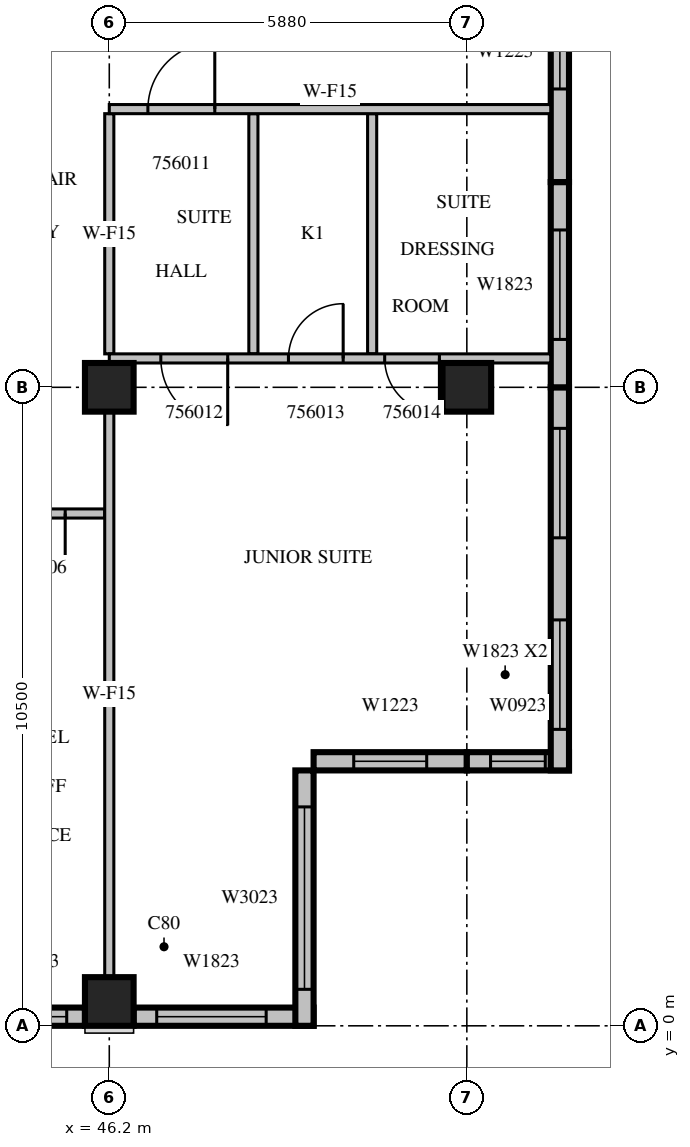
"""IFC4 building model, lengths in metres.
Left out: names, types, materials, properties, quantities, classifications, styles, units other than length and angle.
Written with IfcOpenShell. Run it as: python <this file> out.ifc"""

import sys

from ifc_helpers import new_model, si_unit, direction, frame, frame_2d, origin, origin_2d, place, context, subcontext, project, spatial, rectangle, extrude, source, transform, mapped, element, fill, save


model = new_model("IFC4")
c1 = context("Model", 3, precision=1e-05, world=origin(), true_north=direction((0.0, 1.0)))
c2 = subcontext(c1, "Body", "Model", "MODEL_VIEW")
j1 = project(units=[si_unit("LENGTHUNIT", "METRE"), si_unit("PLANEANGLEUNIT", "RADIAN")], contexts=[c1])
p1 = place(None, origin())
s1 = spatial("IfcSite", under=j1, at=p1, CompositionType="ELEMENT")
p2 = place(p1, origin())
s2 = spatial("IfcBuilding", under=s1, at=p2, CompositionType="ELEMENT")
p3 = place(p2, frame((0.0, 0.0, 246.2)))
s3 = spatial("IfcBuildingStorey", under=s2, at=p3, CompositionType="ELEMENT", Elevation=246.2)
m1 = source(origin(), c2, "Body", "SweptSolid", [
    extrude(rectangle(XDim=0.8, YDim=0.8, at=origin_2d()), origin(), (0.0, 0.0, 1.0), 3.8),
])
for number, where, z_axis, x_axis in (
    (1, (46.2, 0.4, 0.0), (0.0, 0.0, 1.0), (1.0, 0.0, 0.0)),
    (2, (46.2, 10.5, 0.0), (0.0, 0.0, 1.0), (1.0, 0.0, 0.0)),
    (3, (52.08, 10.5, 0.0), (0.0, 0.0, 1.0), (1.0, 0.0, 0.0)),
):
    element("IfcColumn", number, at=place(p3, frame(where, z_axis=z_axis, x_axis=x_axis)), inside=s3, PredefinedType="COLUMN", context=c2, shape_type="MappedRepresentation", body=[
        mapped(m1, transform((0.0, 0.0, 0.0), scale=1.0)),
    ])
m2 = source(origin(), c2, "Body", "SweptSolid", [
    extrude(rectangle(XDim=1.8, YDim=0.3, at=frame_2d((0.9, 0.0))), origin(), (0.0, 0.0, 1.0), 3.4),
])
p4 = place(p3, frame((44.0, 0.15, 0.0), z_axis=(0.0, 0.0, 1.0), x_axis=(1.0, 0.0, 0.0)))
e4 = element("IfcWall", 4, at=p4, inside=s3, PredefinedType="STANDARD", context=c2, shape_type="MappedRepresentation", body=[
    mapped(m2, transform((0.0, 0.0, 0.0), scale=1.0)),
])
m3 = source(origin(), c2, "Body", "SweptSolid", [
    extrude(rectangle(XDim=1.2, YDim=2.3, at=frame_2d((0.6, 1.15))), frame((0.0, 0.16, 0.0), z_axis=(0.0, -1.0, 0.0), x_axis=(1.0, 0.0, 0.0)), (0.0, 0.0, 1.0), 0.32),
])
p5 = place(p4, frame((0.3, 0.0, 0.6)))
e5 = element("IfcOpeningElement", 5, at=p5, cuts=e4, PredefinedType="OPENING", context=c2, shape_type="MappedRepresentation", body=[
    mapped(m3, transform((0.0, 0.0, 0.0), scale=1.0)),
])
m4 = source(origin(), c2, "Body", "SweptSolid", [
    extrude(rectangle(XDim=2.96, YDim=0.3, at=frame_2d((1.48, 0.0))), origin(), (0.0, 0.0, 1.0), 3.4),
])
p6 = place(p3, frame((46.6, 0.15, 0.0), z_axis=(0.0, 0.0, 1.0), x_axis=(1.0, 0.0, 0.0)))
e6 = element("IfcWall", 6, at=p6, inside=s3, PredefinedType="STANDARD", context=c2, shape_type="MappedRepresentation", body=[
    mapped(m4, transform((0.0, 0.0, 0.0), scale=1.0)),
])
m5 = source(origin(), c2, "Body", "SweptSolid", [
    extrude(rectangle(XDim=1.8, YDim=2.3, at=frame_2d((0.9, 1.15))), frame((0.0, 0.16, 0.0), z_axis=(0.0, -1.0, 0.0), x_axis=(1.0, 0.0, 0.0)), (0.0, 0.0, 1.0), 0.32),
])
p7 = place(p6, frame((0.38, 0.0, 0.6)))
e7 = element("IfcOpeningElement", 7, at=p7, cuts=e6, PredefinedType="OPENING", context=c2, shape_type="MappedRepresentation", body=[
    mapped(m5, transform((0.0, 0.0, 0.0), scale=1.0)),
])
m6 = source(origin(), c2, "Body", "SweptSolid", [
    extrude(rectangle(XDim=4.2, YDim=0.3, at=frame_2d((2.1, 0.0))), origin(), (0.0, 0.0, 1.0), 3.4),
])
p8 = place(p3, frame((49.41, 0.0, 0.0), z_axis=(0.0, 0.0, 1.0), x_axis=(0.0, 1.0, 0.0)))
e8 = element("IfcWall", 8, at=p8, inside=s3, PredefinedType="STANDARD", context=c2, shape_type="MappedRepresentation", body=[
    mapped(m6, transform((0.0, 0.0, 0.0), scale=1.0)),
])
m7 = source(origin(), c2, "Body", "SweptSolid", [
    extrude(rectangle(XDim=3.0, YDim=2.3, at=frame_2d((1.5, 1.15))), frame((0.0, 0.16, 0.0), z_axis=(0.0, -1.0, 0.0), x_axis=(1.0, 0.0, 0.0)), (0.0, 0.0, 1.0), 0.32),
])
p9 = place(p8, frame((0.6, 0.0, 0.6)))
e9 = element("IfcOpeningElement", 9, at=p9, cuts=e8, PredefinedType="OPENING", context=c2, shape_type="MappedRepresentation", body=[
    mapped(m7, transform((0.0, 0.0, 0.0), scale=1.0)),
])
m8 = source(origin(), c2, "Body", "SweptSolid", [
    extrude(rectangle(XDim=2.52, YDim=0.3, at=frame_2d((1.26, 0.0))), origin(), (0.0, 0.0, 1.0), 3.4),
])
p10 = place(p3, frame((49.56, 4.35, 0.0), z_axis=(0.0, 0.0, 1.0), x_axis=(1.0, 0.0, 0.0)))
e10 = element("IfcWall", 10, at=p10, inside=s3, PredefinedType="STANDARD", context=c2, shape_type="MappedRepresentation", body=[
    mapped(m8, transform((0.0, 0.0, 0.0), scale=1.0)),
])
p11 = place(p10, frame((0.66, 0.0, 0.6)))
e11 = element("IfcOpeningElement", 11, at=p11, cuts=e10, PredefinedType="OPENING", context=c2, shape_type="MappedRepresentation", body=[
    mapped(m3, transform((0.0, 0.0, 0.0), scale=1.0)),
])
m9 = source(origin(), c2, "Body", "SweptSolid", [
    extrude(rectangle(XDim=1.68, YDim=0.3, at=frame_2d((0.84, 0.0))), origin(), (0.0, 0.0, 1.0), 3.4),
])
p12 = place(p3, frame((52.08, 4.35, 0.0), z_axis=(0.0, 0.0, 1.0), x_axis=(1.0, 0.0, 0.0)))
e12 = element("IfcWall", 12, at=p12, inside=s3, PredefinedType="STANDARD", context=c2, shape_type="MappedRepresentation", body=[
    mapped(m9, transform((0.0, 0.0, 0.0), scale=1.0)),
])
m10 = source(origin(), c2, "Body", "SweptSolid", [
    extrude(rectangle(XDim=0.9, YDim=2.3, at=frame_2d((0.45, 1.15))), frame((0.0, 0.16, 0.0), z_axis=(0.0, -1.0, 0.0), x_axis=(1.0, 0.0, 0.0)), (0.0, 0.0, 1.0), 0.32),
])
p13 = place(p12, frame((0.39, 0.0, 0.6)))
e13 = element("IfcOpeningElement", 13, at=p13, cuts=e12, PredefinedType="OPENING", context=c2, shape_type="MappedRepresentation", body=[
    mapped(m10, transform((0.0, 0.0, 0.0), scale=1.0)),
])
m11 = source(origin(), c2, "Body", "SweptSolid", [
    extrude(rectangle(XDim=6.3, YDim=0.3, at=frame_2d((3.15, 0.0))), origin(), (0.0, 0.0, 1.0), 3.4),
])
p14 = place(p3, frame((53.61, 4.2, 0.0), z_axis=(0.0, 0.0, 1.0), x_axis=(0.0, 1.0, 0.0)))
e14 = element("IfcWall", 14, at=p14, inside=s3, PredefinedType="STANDARD", context=c2, shape_type="MappedRepresentation", body=[
    mapped(m11, transform((0.0, 0.0, 0.0), scale=1.0)),
])
p15 = place(p14, frame((0.675, 0.0, 0.6)))
e15 = element("IfcOpeningElement", 15, at=p15, cuts=e14, PredefinedType="OPENING", context=c2, shape_type="MappedRepresentation", body=[
    mapped(m5, transform((0.0, 0.0, 0.0), scale=1.0)),
])
p16 = place(p14, frame((3.825, 0.0, 0.6)))
e16 = element("IfcOpeningElement", 16, at=p16, cuts=e14, PredefinedType="OPENING", context=c2, shape_type="MappedRepresentation", body=[
    mapped(m5, transform((0.0, 0.0, 0.0), scale=1.0)),
])
m12 = source(origin(), c2, "Body", "SweptSolid", [
    extrude(rectangle(XDim=3.375, YDim=0.3, at=frame_2d((1.688, 0.0))), origin(), (0.0, 0.0, 1.0), 3.4),
])
p17 = place(p3, frame((53.61, 10.5, 0.0), z_axis=(0.0, 0.0, 1.0), x_axis=(0.0, 1.0, 0.0)))
e17 = element("IfcWall", 17, at=p17, inside=s3, PredefinedType="STANDARD", context=c2, shape_type="MappedRepresentation", body=[
    mapped(m12, transform((0.0, 0.0, 0.0), scale=1.0)),
])
p18 = place(p17, frame((0.787, 0.0, 0.6)))
e18 = element("IfcOpeningElement", 18, at=p18, cuts=e17, PredefinedType="OPENING", context=c2, shape_type="MappedRepresentation", body=[
    mapped(m5, transform((0.0, 0.0, 0.0), scale=1.0)),
])
p19 = place(p3, frame((53.61, 13.875, 0.0), z_axis=(0.0, 0.0, 1.0), x_axis=(0.0, 1.0, 0.0)))
e19 = element("IfcWall", 19, at=p19, inside=s3, PredefinedType="STANDARD", context=c2, shape_type="MappedRepresentation", body=[
    mapped(m12, transform((0.0, 0.0, 0.0), scale=1.0)),
])
p20 = place(p19, frame((1.531, 0.0, 0.6)))
e20 = element("IfcOpeningElement", 20, at=p20, cuts=e19, PredefinedType="OPENING", context=c2, shape_type="MappedRepresentation", body=[
    mapped(m3, transform((0.0, 0.0, 0.0), scale=1.0)),
])
m13 = source(origin(), c2, "Body", "SweptSolid", [
    extrude(rectangle(XDim=2.2, YDim=0.15, at=frame_2d((1.1, 0.0))), origin(), (0.0, 0.0, 1.0), 3.4),
])
p21 = place(p3, frame((46.125, 8.425, 0.0), z_axis=(0.0, 0.0, 1.0), x_axis=(-1.0, 0.0, 0.0)))
e21 = element("IfcWall", 21, at=p21, inside=s3, PredefinedType="PARTITIONING", context=c2, shape_type="MappedRepresentation", body=[
    mapped(m13, transform((0.0, 0.0, 0.0), scale=1.0)),
])
m14 = source(origin(), c2, "Body", "SweptSolid", [
    extrude(rectangle(XDim=0.9, YDim=2.1, at=frame_2d((0.45, 1.05))), frame((0.0, 0.085, 0.0), z_axis=(0.0, -1.0, 0.0), x_axis=(1.0, 0.0, 0.0)), (0.0, 0.0, 1.0), 0.17),
])
p22 = place(p21, frame((0.65, 0.0, 0.0)))
e22 = element("IfcOpeningElement", 22, at=p22, cuts=e21, PredefinedType="OPENING", context=c2, shape_type="MappedRepresentation", body=[
    mapped(m14, transform((0.0, 0.0, 0.0), scale=1.0)),
])
m15 = source(origin(), c2, "Body", "SweptSolid", [
    extrude(rectangle(XDim=3.95, YDim=0.15, at=frame_2d((1.975, 0.0))), origin(), (0.0, 0.0, 1.0), 3.4),
])
for number, where, z_axis, x_axis in (
    (23, (48.57, 11.05, 0.0), (0.0, 0.0, 1.0), (0.0, 1.0, 0.0)),
    (24, (50.523, 11.05, 0.0), (0.0, 0.0, 1.0), (0.0, 1.0, 0.0)),
):
    element("IfcWall", number, at=place(p3, frame(where, z_axis=z_axis, x_axis=x_axis)), inside=s3, PredefinedType="PARTITIONING", context=c2, shape_type="MappedRepresentation", body=[
        mapped(m15, transform((0.0, 0.0, 0.0), scale=1.0)),
    ])
m16 = source(origin(), c2, "Body", "SweptSolid", [
    extrude(rectangle(XDim=9.302, YDim=0.15, at=frame_2d((4.651, 0.0))), origin(), (0.0, 0.0, 1.0), 3.4),
])
p23 = place(p3, frame((46.2, 0.799, 0.0), z_axis=(0.0, 0.0, 1.0), x_axis=(0.0, 1.0, 0.0)))
e25 = element("IfcWall", 25, at=p23, inside=s3, PredefinedType="PARTITIONING", context=c2, shape_type="MappedRepresentation", body=[
    mapped(m16, transform((0.0, 0.0, 0.0), scale=1.0)),
])
p24 = place(p3, frame((46.2, 11.05, 0.0), z_axis=(0.0, 0.0, 1.0), x_axis=(0.0, 1.0, 0.0)))
e26 = element("IfcWall", 26, at=p24, inside=s3, PredefinedType="PARTITIONING", context=c2, shape_type="MappedRepresentation", body=[
    mapped(m15, transform((0.0, 0.0, 0.0), scale=1.0)),
])
m17 = source(origin(), c2, "Body", "SweptSolid", [
    extrude(rectangle(XDim=7.26, YDim=0.15, at=frame_2d((3.63, 0.0))), origin(), (0.0, 0.0, 1.0), 3.4),
])
p25 = place(p3, frame((53.46, 10.975, 0.0), z_axis=(0.0, 0.0, 1.0), x_axis=(-1.0, 0.0, 0.0)))
e27 = element("IfcWall", 27, at=p25, inside=s3, PredefinedType="PARTITIONING", context=c2, shape_type="MappedRepresentation", body=[
    mapped(m17, transform((0.0, 0.0, 0.0), scale=1.0)),
])
m18 = source(origin(), c2, "Body", "SweptSolid", [
    extrude(rectangle(XDim=1.1, YDim=2.1, at=frame_2d((0.55, 1.05))), frame((0.0, 0.085, 0.0), z_axis=(0.0, -1.0, 0.0), x_axis=(1.0, 0.0, 0.0)), (0.0, 0.0, 1.0), 0.17),
])
p26 = place(p25, frame((5.313, 0.0, 0.0)))
e28 = element("IfcOpeningElement", 28, at=p26, cuts=e27, PredefinedType="OPENING", context=c2, shape_type="MappedRepresentation", body=[
    mapped(m18, transform((0.0, 0.0, 0.0), scale=1.0)),
])
p27 = place(p25, frame((3.414, 0.0, 0.0)))
e29 = element("IfcOpeningElement", 29, at=p27, cuts=e27, PredefinedType="OPENING", context=c2, shape_type="MappedRepresentation", body=[
    mapped(m14, transform((0.0, 0.0, 0.0), scale=1.0)),
])
p28 = place(p25, frame((1.831, 0.0, 0.0)))
e30 = element("IfcOpeningElement", 30, at=p28, cuts=e27, PredefinedType="OPENING", context=c2, shape_type="MappedRepresentation", body=[
    mapped(m14, transform((0.0, 0.0, 0.0), scale=1.0)),
])
p29 = place(p3, frame((53.46, 15.075, 0.0), z_axis=(0.0, 0.0, 1.0), x_axis=(-1.0, 0.0, 0.0)))
e31 = element("IfcWall", 31, at=p29, inside=s3, PredefinedType="PARTITIONING", context=c2, shape_type="MappedRepresentation", body=[
    mapped(m17, transform((0.0, 0.0, 0.0), scale=1.0)),
])
p30 = place(p29, frame((5.525, 0.0, 0.0)))
e32 = element("IfcOpeningElement", 32, at=p30, cuts=e31, PredefinedType="OPENING", context=c2, shape_type="MappedRepresentation", body=[
    mapped(m18, transform((0.0, 0.0, 0.0), scale=1.0)),
])
m19 = source(origin(), c2, "Body", "SweptSolid", [
    extrude(rectangle(XDim=1.2, YDim=2.3, at=frame_2d((0.6, 1.15))), frame((0.0, 0.03, 0.0), z_axis=(0.0, -1.0, 0.0), x_axis=(1.0, 0.0, 0.0)), (0.0, 0.0, 1.0), 0.06),
])
p31 = place(p5, origin())
e33 = element("IfcWindow", 33, at=p31, inside=s3, PartitioningType="SINGLE_PANEL", PredefinedType="WINDOW", context=c2, shape_type="MappedRepresentation", body=[
    mapped(m19, transform((0.0, 0.0, 0.0), scale=1.0)),
])
fill(e5, e33)
m20 = source(origin(), c2, "Body", "SweptSolid", [
    extrude(rectangle(XDim=1.8, YDim=2.3, at=frame_2d((0.9, 1.15))), frame((0.0, 0.03, 0.0), z_axis=(0.0, -1.0, 0.0), x_axis=(1.0, 0.0, 0.0)), (0.0, 0.0, 1.0), 0.06),
])
p32 = place(p7, origin())
e34 = element("IfcWindow", 34, at=p32, inside=s3, PartitioningType="SINGLE_PANEL", PredefinedType="WINDOW", context=c2, shape_type="MappedRepresentation", body=[
    mapped(m20, transform((0.0, 0.0, 0.0), scale=1.0)),
])
fill(e7, e34)
m21 = source(origin(), c2, "Body", "SweptSolid", [
    extrude(rectangle(XDim=3.0, YDim=2.3, at=frame_2d((1.5, 1.15))), frame((0.0, 0.03, 0.0), z_axis=(0.0, -1.0, 0.0), x_axis=(1.0, 0.0, 0.0)), (0.0, 0.0, 1.0), 0.06),
])
p33 = place(p9, origin())
e35 = element("IfcWindow", 35, at=p33, inside=s3, PartitioningType="SINGLE_PANEL", PredefinedType="WINDOW", context=c2, shape_type="MappedRepresentation", body=[
    mapped(m21, transform((0.0, 0.0, 0.0), scale=1.0)),
])
fill(e9, e35)
p34 = place(p11, origin())
e36 = element("IfcWindow", 36, at=p34, inside=s3, PartitioningType="SINGLE_PANEL", PredefinedType="WINDOW", context=c2, shape_type="MappedRepresentation", body=[
    mapped(m19, transform((0.0, 0.0, 0.0), scale=1.0)),
])
fill(e11, e36)
m22 = source(origin(), c2, "Body", "SweptSolid", [
    extrude(rectangle(XDim=0.9, YDim=2.3, at=frame_2d((0.45, 1.15))), frame((0.0, 0.03, 0.0), z_axis=(0.0, -1.0, 0.0), x_axis=(1.0, 0.0, 0.0)), (0.0, 0.0, 1.0), 0.06),
])
p35 = place(p13, origin())
e37 = element("IfcWindow", 37, at=p35, inside=s3, PartitioningType="SINGLE_PANEL", PredefinedType="WINDOW", context=c2, shape_type="MappedRepresentation", body=[
    mapped(m22, transform((0.0, 0.0, 0.0), scale=1.0)),
])
fill(e13, e37)
p36 = place(p15, origin())
e38 = element("IfcWindow", 38, at=p36, inside=s3, PartitioningType="SINGLE_PANEL", PredefinedType="WINDOW", context=c2, shape_type="MappedRepresentation", body=[
    mapped(m20, transform((0.0, 0.0, 0.0), scale=1.0)),
])
fill(e15, e38)
p37 = place(p16, origin())
e39 = element("IfcWindow", 39, at=p37, inside=s3, PartitioningType="SINGLE_PANEL", PredefinedType="WINDOW", context=c2, shape_type="MappedRepresentation", body=[
    mapped(m20, transform((0.0, 0.0, 0.0), scale=1.0)),
])
fill(e16, e39)
p38 = place(p18, origin())
e40 = element("IfcWindow", 40, at=p38, inside=s3, PartitioningType="SINGLE_PANEL", PredefinedType="WINDOW", context=c2, shape_type="MappedRepresentation", body=[
    mapped(m20, transform((0.0, 0.0, 0.0), scale=1.0)),
])
fill(e18, e40)
p39 = place(p20, origin())
e41 = element("IfcWindow", 41, at=p39, inside=s3, PartitioningType="SINGLE_PANEL", PredefinedType="WINDOW", context=c2, shape_type="MappedRepresentation", body=[
    mapped(m19, transform((0.0, 0.0, 0.0), scale=1.0)),
])
fill(e20, e41)
m23 = source(origin(), c2, "Body", "SweptSolid", [
    extrude(rectangle(XDim=0.9, YDim=2.1, at=frame_2d((0.45, 1.05))), frame((0.0, 0.025, 0.0), z_axis=(0.0, -1.0, 0.0), x_axis=(1.0, 0.0, 0.0)), (0.0, 0.0, 1.0), 0.05),
])
p40 = place(p22, origin())
e42 = element("IfcDoor", 42, at=p40, inside=s3, OperationType="SINGLE_SWING_LEFT", PredefinedType="DOOR", context=c2, shape_type="MappedRepresentation", body=[
    mapped(m23, transform((0.0, 0.0, 0.0), scale=1.0)),
])
fill(e22, e42)
m24 = source(origin(), c2, "Body", "SweptSolid", [
    extrude(rectangle(XDim=1.1, YDim=2.1, at=frame_2d((0.55, 1.05))), frame((0.0, 0.025, 0.0), z_axis=(0.0, -1.0, 0.0), x_axis=(1.0, 0.0, 0.0)), (0.0, 0.0, 1.0), 0.05),
])
p41 = place(p30, origin())
e43 = element("IfcDoor", 43, at=p41, inside=s3, OperationType="SINGLE_SWING_RIGHT", PredefinedType="DOOR", context=c2, shape_type="MappedRepresentation", body=[
    mapped(m24, transform((0.0, 0.0, 0.0), scale=1.0)),
])
fill(e32, e43)
p42 = place(p26, origin())
e44 = element("IfcDoor", 44, at=p42, inside=s3, OperationType="SINGLE_SWING_LEFT", PredefinedType="DOOR", context=c2, shape_type="MappedRepresentation", body=[
    mapped(m24, transform((0.0, 0.0, 0.0), scale=1.0)),
])
fill(e28, e44)
p43 = place(p27, origin())
e45 = element("IfcDoor", 45, at=p43, inside=s3, OperationType="SINGLE_SWING_RIGHT", PredefinedType="DOOR", context=c2, shape_type="MappedRepresentation", body=[
    mapped(m23, transform((0.0, 0.0, 0.0), scale=1.0)),
])
fill(e29, e45)
p44 = place(p28, origin())
e46 = element("IfcDoor", 46, at=p44, inside=s3, OperationType="SINGLE_SWING_LEFT", PredefinedType="DOOR", context=c2, shape_type="MappedRepresentation", body=[
    mapped(m23, transform((0.0, 0.0, 0.0), scale=1.0)),
])
fill(e30, e46)
save(model, sys.argv[1])
